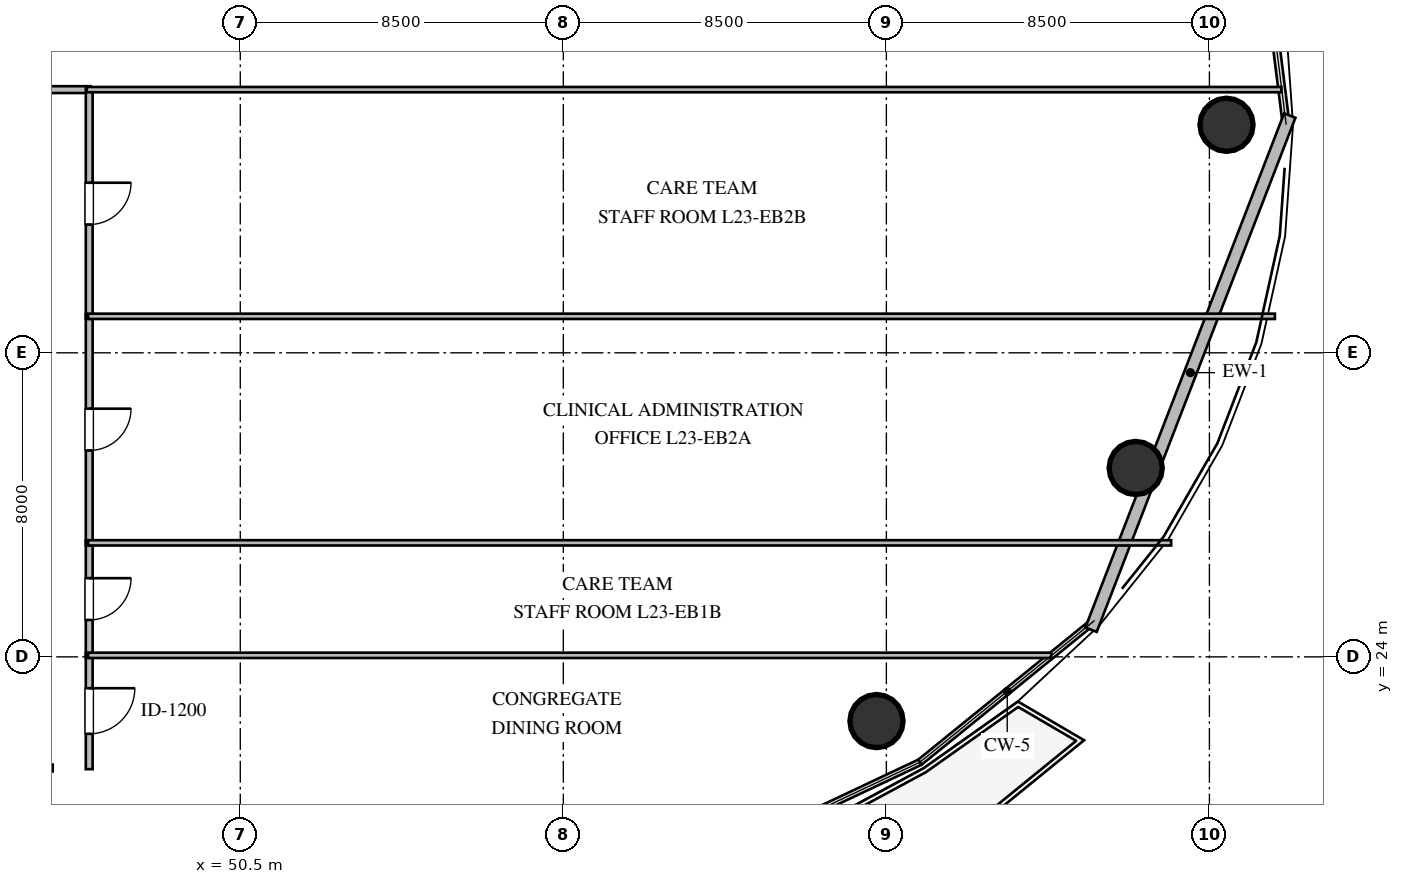
"""IFC4 building model, lengths in metres.
Left out: names, types, materials, properties, quantities, classifications, styles, units other than length and angle.
Written with IfcOpenShell. Run it as: python <this file> out.ifc"""

import sys

from ifc_helpers import new_model, si_unit, direction, frame, frame_2d, origin, origin_2d, place, context, subcontext, project, spatial, rectangle, circle, extrude, element, fill, save


model = new_model("IFC4")
c1 = context("Model", 3, precision=1e-05, world=origin(), true_north=direction((0.0, 1.0)))
c2 = subcontext(c1, "Body", "Model", "MODEL_VIEW")
j1 = project(units=[si_unit("LENGTHUNIT", "METRE"), si_unit("PLANEANGLEUNIT", "RADIAN")], contexts=[c1])
p1 = place(None, origin())
s1 = spatial("IfcSite", under=j1, at=p1, CompositionType="ELEMENT")
p2 = place(p1, origin())
s2 = spatial("IfcBuilding", under=s1, at=p2, CompositionType="ELEMENT")
p3 = place(p2, frame((0.0, 0.0, 88.8)))
s3 = spatial("IfcBuildingStorey", under=s2, at=p3, CompositionType="ELEMENT", Elevation=88.8)
for number, where, z_axis, x_axis in (
    (1, (76.45, 38.0, 0.0), (0.0, 0.0, 1.0), (1.0, 0.0, 0.0)),
    (2, (67.24, 22.31, 0.0), (0.0, 0.0, 1.0), (1.0, 0.0, 0.0)),
    (3, (74.06, 28.97, 0.0), (0.0, 0.0, 1.0), (1.0, 0.0, 0.0)),
):
    element("IfcColumn", number, at=place(p3, frame(where, z_axis=z_axis, x_axis=x_axis)), inside=s3, PredefinedType="COLUMN", context=c2, shape_type="SweptSolid", body=[
        extrude(circle(Radius=0.7, at=origin_2d()), origin(), (0.0, 0.0, 1.0), 3.6),
    ])
p4 = place(p3, frame((78.114, 38.243, 0.0), z_axis=(0.0, 0.0, 1.0), x_axis=(-0.360517110943, -0.932752599952, 0.0)))
e4 = element("IfcWall", 4, at=p4, inside=s3, PredefinedType="STANDARD", context=c2, shape_type="SweptSolid", body=[
    extrude(rectangle(XDim=14.504, YDim=0.32, at=frame_2d((7.252, 0.0))), origin(), (0.0, 0.0, 1.0), 2.577),
])
p5 = place(p3, frame((42.435, 38.925, 0.0), z_axis=(0.0, 0.0, 1.0), x_axis=(1.0, 0.0, 0.0)))
e5 = element("IfcWall", 5, at=p5, inside=s3, PredefinedType="PARTITIONING", context=c2, shape_type="SweptSolid", body=[
    extrude(rectangle(XDim=4.12, YDim=0.18, at=frame_2d((2.06, 0.0))), origin(), (0.0, 0.0, 1.0), 3.28),
])
p6 = place(p5, frame((1.51, 0.0, 0.0)))
e6 = element("IfcOpeningElement", 6, at=p6, cuts=e5, PredefinedType="OPENING", context=c2, shape_type="SweptSolid", body=[
    extrude(rectangle(XDim=1.1, YDim=2.1, at=frame_2d((0.55, 1.05))), frame((0.0, 0.1, 0.0), z_axis=(0.0, -1.0, 0.0), x_axis=(1.0, 0.0, 0.0)), (0.0, 0.0, 1.0), 0.2),
])
p7 = place(p3, frame((46.525, 24.105, 0.0), z_axis=(0.0, 0.0, 1.0), x_axis=(0.0, -1.0, 0.0)))
e7 = element("IfcWall", 7, at=p7, inside=s3, PredefinedType="PARTITIONING", context=c2, shape_type="SweptSolid", body=[
    extrude(rectangle(XDim=3.06, YDim=0.18, at=frame_2d((1.53, 0.0))), origin(), (0.0, 0.0, 1.0), 3.28),
])
p8 = place(p7, frame((0.93, 0.0, 0.0)))
e8 = element("IfcOpeningElement", 8, at=p8, cuts=e7, PredefinedType="OPENING", context=c2, shape_type="SweptSolid", body=[
    extrude(rectangle(XDim=1.2, YDim=2.15, at=frame_2d((0.6, 1.075))), frame((0.0, 0.1, 0.0), z_axis=(0.0, -1.0, 0.0), x_axis=(1.0, 0.0, 0.0)), (0.0, 0.0, 1.0), 0.2),
])
p9 = place(p3, frame((46.525, 27.065, 0.0), z_axis=(0.0, 0.0, 1.0), x_axis=(0.0, -1.0, 0.0)))
e9 = element("IfcWall", 9, at=p9, inside=s3, PredefinedType="PARTITIONING", context=c2, shape_type="SweptSolid", body=[
    extrude(rectangle(XDim=3.09, YDim=0.18, at=frame_2d((1.545, 0.0))), origin(), (0.0, 0.0, 1.0), 3.28),
])
p10 = place(p9, frame((0.995, 0.0, 0.0)))
e10 = element("IfcOpeningElement", 10, at=p10, cuts=e9, PredefinedType="OPENING", context=c2, shape_type="SweptSolid", body=[
    extrude(rectangle(XDim=1.1, YDim=2.1, at=frame_2d((0.55, 1.05))), frame((0.0, 0.1, 0.0), z_axis=(0.0, -1.0, 0.0), x_axis=(1.0, 0.0, 0.0)), (0.0, 0.0, 1.0), 0.2),
])
p11 = place(p3, frame((46.525, 33.025, 0.0), z_axis=(0.0, 0.0, 1.0), x_axis=(0.0, -1.0, 0.0)))
e11 = element("IfcWall", 11, at=p11, inside=s3, PredefinedType="PARTITIONING", context=c2, shape_type="SweptSolid", body=[
    extrude(rectangle(XDim=6.09, YDim=0.18, at=frame_2d((3.045, 0.0))), origin(), (0.0, 0.0, 1.0), 3.28),
])
p12 = place(p11, frame((2.495, 0.0, 0.0)))
e12 = element("IfcOpeningElement", 12, at=p12, cuts=e11, PredefinedType="OPENING", context=c2, shape_type="SweptSolid", body=[
    extrude(rectangle(XDim=1.1, YDim=2.1, at=frame_2d((0.55, 1.05))), frame((0.0, 0.1, 0.0), z_axis=(0.0, -1.0, 0.0), x_axis=(1.0, 0.0, 0.0)), (0.0, 0.0, 1.0), 0.2),
])
p13 = place(p3, frame((46.525, 38.955, 0.0), z_axis=(0.0, 0.0, 1.0), x_axis=(0.0, -1.0, 0.0)))
e13 = element("IfcWall", 13, at=p13, inside=s3, PredefinedType="PARTITIONING", context=c2, shape_type="SweptSolid", body=[
    extrude(rectangle(XDim=6.06, YDim=0.18, at=frame_2d((3.03, 0.0))), origin(), (0.0, 0.0, 1.0), 3.28),
])
p14 = place(p13, frame((2.48, 0.0, 0.0)))
e14 = element("IfcOpeningElement", 14, at=p14, cuts=e13, PredefinedType="OPENING", context=c2, shape_type="SweptSolid", body=[
    extrude(rectangle(XDim=1.1, YDim=2.1, at=frame_2d((0.55, 1.05))), frame((0.0, 0.1, 0.0), z_axis=(0.0, -1.0, 0.0), x_axis=(1.0, 0.0, 0.0)), (0.0, 0.0, 1.0), 0.2),
])
p15 = place(p3, frame((45.565, 21.075, 0.0), z_axis=(0.0, 0.0, 1.0), x_axis=(-1.0, 0.0, 0.0)))
e15 = element("IfcWall", 15, at=p15, inside=s3, PredefinedType="PARTITIONING", context=c2, shape_type="SweptSolid", body=[
    extrude(rectangle(XDim=14.13, YDim=0.18, at=frame_2d((7.065, 0.0))), origin(), (0.0, 0.0, 1.0), 2.916),
])
p16 = place(p15, frame((6.515, 0.0, 0.0)))
e16 = element("IfcOpeningElement", 16, at=p16, cuts=e15, PredefinedType="OPENING", context=c2, shape_type="SweptSolid", body=[
    extrude(rectangle(XDim=1.1, YDim=2.1, at=frame_2d((0.55, 1.05))), frame((0.0, 0.1, 0.0), z_axis=(0.0, -1.0, 0.0), x_axis=(1.0, 0.0, 0.0)), (0.0, 0.0, 1.0), 0.2),
])
p17 = place(p3, frame((77.894, 38.925, 0.0), z_axis=(0.0, 0.0, 1.0), x_axis=(-1.0, 0.0, 0.0)))
e17 = element("IfcWall", 17, at=p17, inside=s3, PredefinedType="PARTITIONING", context=c2, shape_type="SweptSolid", body=[
    extrude(rectangle(XDim=31.434, YDim=0.14, at=frame_2d((15.717, 0.0))), origin(), (0.0, 0.0, 1.0), 3.28),
])
p18 = place(p3, frame((46.495, 24.04, 0.0), z_axis=(0.0, 0.0, 1.0), x_axis=(1.0, 0.0, 0.0)))
e18 = element("IfcWall", 18, at=p18, inside=s3, PredefinedType="PARTITIONING", context=c2, shape_type="SweptSolid", body=[
    extrude(rectangle(XDim=25.344, YDim=0.14, at=frame_2d((12.672, 0.0))), origin(), (0.0, 0.0, 1.0), 2.81),
])
p19 = place(p3, frame((46.495, 27.0, 0.0), z_axis=(0.0, 0.0, 1.0), x_axis=(1.0, 0.0, 0.0)))
e19 = element("IfcWall", 19, at=p19, inside=s3, PredefinedType="PARTITIONING", context=c2, shape_type="SweptSolid", body=[
    extrude(rectangle(XDim=28.499, YDim=0.14, at=frame_2d((14.25, 0.0))), origin(), (0.0, 0.0, 1.0), 2.81),
])
p20 = place(p3, frame((46.495, 32.96, 0.0), z_axis=(0.0, 0.0, 1.0), x_axis=(1.0, 0.0, 0.0)))
e20 = element("IfcWall", 20, at=p20, inside=s3, PredefinedType="PARTITIONING", context=c2, shape_type="SweptSolid", body=[
    extrude(rectangle(XDim=31.228, YDim=0.14, at=frame_2d((15.614, 0.0))), origin(), (0.0, 0.0, 1.0), 3.28),
])
p21 = place(p8, origin())
e21 = element("IfcDoor", 21, at=p21, inside=s3, OperationType="SINGLE_SWING_LEFT", PredefinedType="DOOR", context=c2, shape_type="SweptSolid", body=[
    extrude(rectangle(XDim=1.2, YDim=2.15, at=frame_2d((0.6, 1.075))), frame((0.0, 0.025, 0.0), z_axis=(0.0, -1.0, 0.0), x_axis=(1.0, 0.0, 0.0)), (0.0, 0.0, 1.0), 0.05),
])
fill(e8, e21)
p22 = place(p10, origin())
e22 = element("IfcDoor", 22, at=p22, inside=s3, OperationType="SINGLE_SWING_LEFT", PredefinedType="DOOR", context=c2, shape_type="SweptSolid", body=[
    extrude(rectangle(XDim=1.1, YDim=2.1, at=frame_2d((0.55, 1.05))), frame((0.0, 0.025, 0.0), z_axis=(0.0, -1.0, 0.0), x_axis=(1.0, 0.0, 0.0)), (0.0, 0.0, 1.0), 0.05),
])
fill(e10, e22)
p23 = place(p12, origin())
e23 = element("IfcDoor", 23, at=p23, inside=s3, OperationType="SINGLE_SWING_LEFT", PredefinedType="DOOR", context=c2, shape_type="SweptSolid", body=[
    extrude(rectangle(XDim=1.1, YDim=2.1, at=frame_2d((0.55, 1.05))), frame((0.0, 0.025, 0.0), z_axis=(0.0, -1.0, 0.0), x_axis=(1.0, 0.0, 0.0)), (0.0, 0.0, 1.0), 0.05),
])
fill(e12, e23)
p24 = place(p14, origin())
e24 = element("IfcDoor", 24, at=p24, inside=s3, OperationType="SINGLE_SWING_LEFT", PredefinedType="DOOR", context=c2, shape_type="SweptSolid", body=[
    extrude(rectangle(XDim=1.1, YDim=2.1, at=frame_2d((0.55, 1.05))), frame((0.0, 0.025, 0.0), z_axis=(0.0, -1.0, 0.0), x_axis=(1.0, 0.0, 0.0)), (0.0, 0.0, 1.0), 0.05),
])
fill(e14, e24)
save(model, sys.argv[1])
